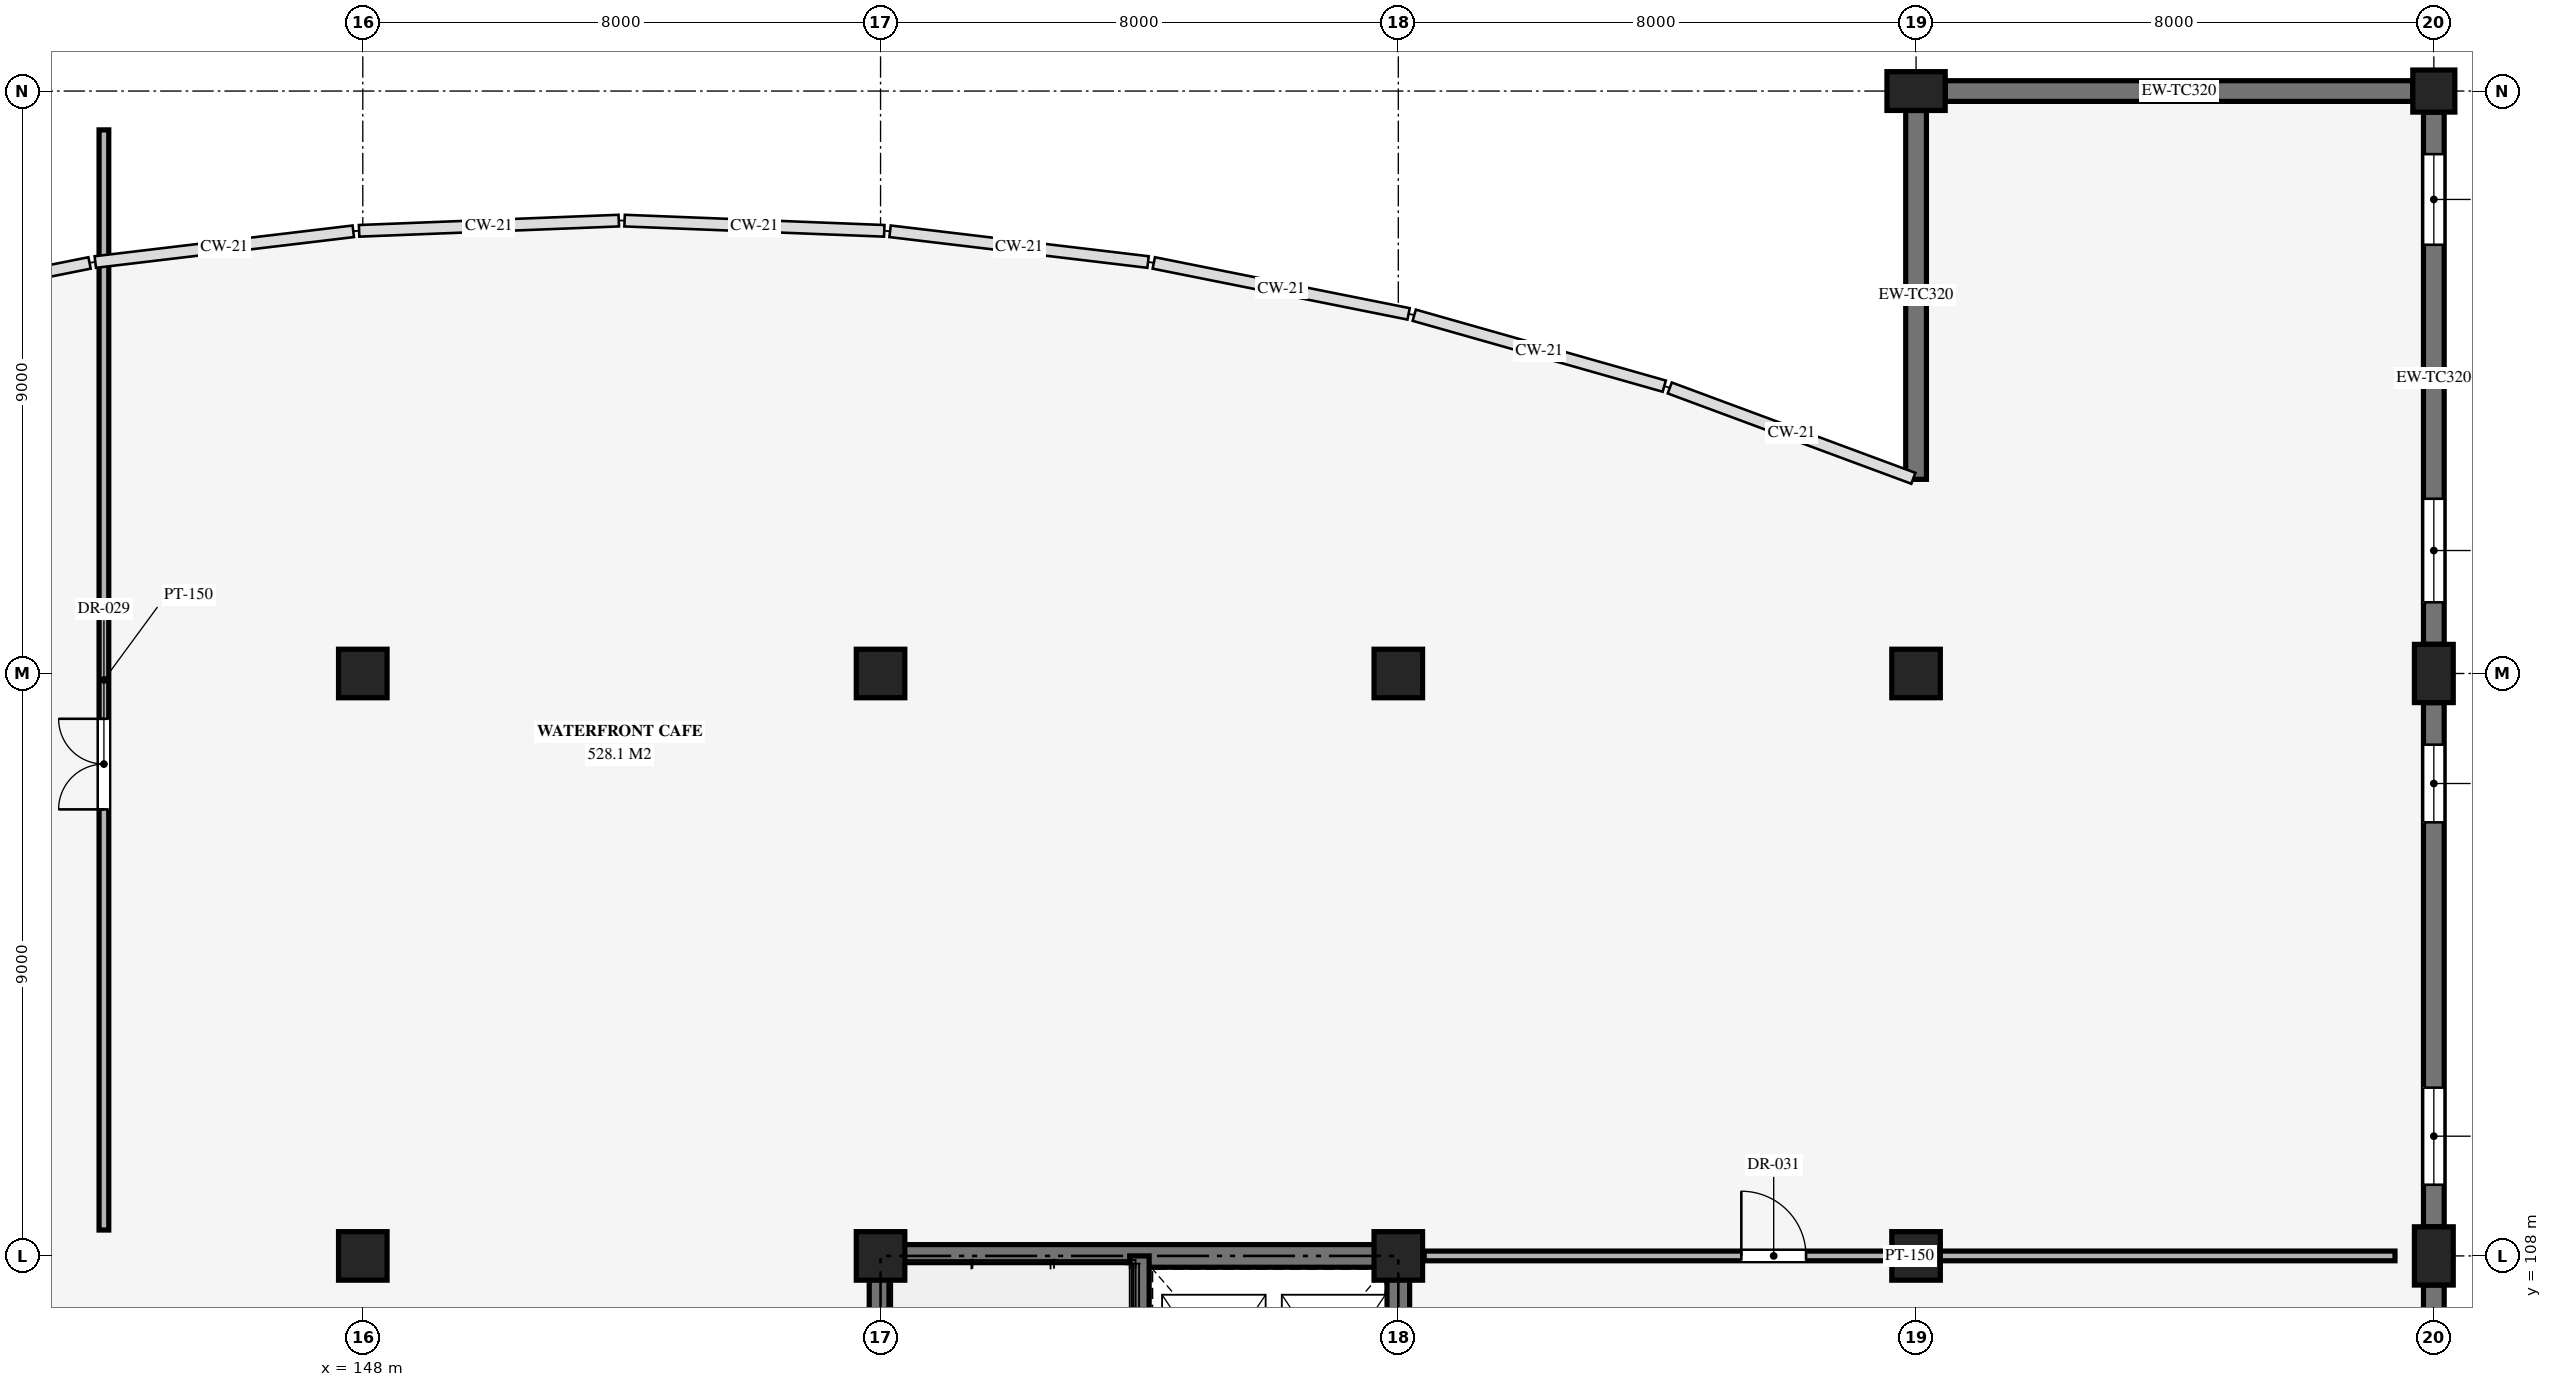
"""IFC4 building model, lengths in metres.
Left out: names, types, materials, properties, quantities, classifications, styles, units other than length and angle.
Written with IfcOpenShell. Run it as: python <this file> out.ifc"""

import sys

from ifc_helpers import new_model, si_unit, direction, frame, frame_2d, origin, origin_2d, place, context, subcontext, project, spatial, rectangle, extrude, element, fill, save


model = new_model("IFC4")
c1 = context("Model", 3, precision=1e-05, world=origin(), true_north=direction((0.0, 1.0)))
c2 = subcontext(c1, "Body", "Model", "MODEL_VIEW")
j1 = project(units=[si_unit("LENGTHUNIT", "METRE"), si_unit("PLANEANGLEUNIT", "RADIAN")], contexts=[c1])
p1 = place(None, origin())
s1 = spatial("IfcSite", under=j1, at=p1, CompositionType="ELEMENT")
p2 = place(p1, origin())
s2 = spatial("IfcBuilding", under=s1, at=p2, CompositionType="ELEMENT")
p3 = place(p2, frame((0.0, 0.0, 5.4)))
s3 = spatial("IfcBuildingStorey", under=s2, at=p3, CompositionType="ELEMENT", Elevation=5.4)
for number, where, z_axis, x_axis in (
    (1, (148.0, 108.0, 0.0), (0.0, 0.0, 1.0), (1.0, 0.0, 0.0)),
    (2, (148.0, 117.0, 0.0), (0.0, 0.0, 1.0), (1.0, 0.0, 0.0)),
    (3, (156.0, 108.0, 0.0), (0.0, 0.0, 1.0), (1.0, 0.0, 0.0)),
    (4, (156.0, 117.0, 0.0), (0.0, 0.0, 1.0), (1.0, 0.0, 0.0)),
    (5, (164.0, 108.0, 0.0), (0.0, 0.0, 1.0), (1.0, 0.0, 0.0)),
    (6, (164.0, 117.0, 0.0), (0.0, 0.0, 1.0), (1.0, 0.0, 0.0)),
    (7, (172.0, 108.0, 0.0), (0.0, 0.0, 1.0), (1.0, 0.0, 0.0)),
    (8, (172.0, 117.0, 0.0), (0.0, 0.0, 1.0), (1.0, 0.0, 0.0)),
):
    element("IfcColumn", number, at=place(p3, frame(where, z_axis=z_axis, x_axis=x_axis)), inside=s3, PredefinedType="COLUMN", context=c2, shape_type="SweptSolid", body=[
        extrude(rectangle(XDim=0.75, YDim=0.75, at=origin_2d()), origin(), (0.0, 0.0, 1.0), 4.64),
    ])
for number, where, z_axis, x_axis in (
    (9, (172.0, 126.0, 0.0), (0.0, 0.0, 1.0), (0.0, 1.0, 0.0)),
    (10, (180.0, 108.0, 0.0), (0.0, 0.0, 1.0), (1.0, 0.0, 0.0)),
    (11, (180.0, 117.0, 0.0), (0.0, 0.0, 1.0), (1.0, 0.0, 0.0)),
):
    element("IfcColumn", number, at=place(p3, frame(where, z_axis=z_axis, x_axis=x_axis)), inside=s3, PredefinedType="PILASTER", context=c2, shape_type="SweptSolid", body=[
        extrude(rectangle(XDim=0.6, YDim=0.9, at=origin_2d()), origin(), (0.0, 0.0, 1.0), 4.64),
    ])
p4 = place(p3, frame((180.0, 126.0, 0.0), z_axis=(0.0, 0.0, 1.0), x_axis=(1.0, 0.0, 0.0)))
e12 = element("IfcColumn", 12, at=p4, inside=s3, PredefinedType="COLUMN", context=c2, shape_type="SweptSolid", body=[
    extrude(rectangle(XDim=0.65, YDim=0.65, at=origin_2d()), origin(), (0.0, 0.0, 1.0), 4.64),
])
p5 = place(p3, frame((180.0, 99.45, 0.0), z_axis=(0.0, 0.0, 1.0), x_axis=(0.0, 1.0, 0.0)))
e13 = element("IfcWall", 13, at=p5, inside=s3, PredefinedType="SOLIDWALL", context=c2, shape_type="SweptSolid", body=[
    extrude(rectangle(XDim=8.1, YDim=0.32, at=frame_2d((4.05, 0.0))), origin(), (0.0, 0.0, 1.0), 4.52),
])
p6 = place(p5, frame((0.65, 0.0, 0.95)))
e14 = element("IfcOpeningElement", 14, at=p6, cuts=e13, PredefinedType="OPENING", context=c2, shape_type="SweptSolid", body=[
    extrude(rectangle(XDim=2.4, YDim=1.5, at=frame_2d((1.2, 0.75))), frame((0.0, 0.17, 0.0), z_axis=(0.0, -1.0, 0.0), x_axis=(1.0, 0.0, 0.0)), (0.0, 0.0, 1.0), 0.34),
])
p7 = place(p5, frame((5.65, 0.0, 0.95)))
e15 = element("IfcOpeningElement", 15, at=p7, cuts=e13, PredefinedType="OPENING", context=c2, shape_type="SweptSolid", body=[
    extrude(rectangle(XDim=1.8, YDim=1.5, at=frame_2d((0.9, 0.75))), frame((0.0, 0.17, 0.0), z_axis=(0.0, -1.0, 0.0), x_axis=(1.0, 0.0, 0.0)), (0.0, 0.0, 1.0), 0.34),
])
p8 = place(p3, frame((180.0, 108.45, 0.0), z_axis=(0.0, 0.0, 1.0), x_axis=(0.0, 1.0, 0.0)))
e16 = element("IfcWall", 16, at=p8, inside=s3, PredefinedType="SOLIDWALL", context=c2, shape_type="SweptSolid", body=[
    extrude(rectangle(XDim=8.1, YDim=0.32, at=frame_2d((4.05, 0.0))), origin(), (0.0, 0.0, 1.0), 4.52),
])
p9 = place(p8, frame((0.65, 0.0, 0.95)))
e17 = element("IfcOpeningElement", 17, at=p9, cuts=e16, PredefinedType="OPENING", context=c2, shape_type="SweptSolid", body=[
    extrude(rectangle(XDim=1.5, YDim=1.5, at=frame_2d((0.75, 0.75))), frame((0.0, 0.17, 0.0), z_axis=(0.0, -1.0, 0.0), x_axis=(1.0, 0.0, 0.0)), (0.0, 0.0, 1.0), 0.34),
])
p10 = place(p8, frame((6.25, 0.0, 0.95)))
e18 = element("IfcOpeningElement", 18, at=p10, cuts=e16, PredefinedType="OPENING", context=c2, shape_type="SweptSolid", body=[
    extrude(rectangle(XDim=1.2, YDim=1.5, at=frame_2d((0.6, 0.75))), frame((0.0, 0.17, 0.0), z_axis=(0.0, -1.0, 0.0), x_axis=(1.0, 0.0, 0.0)), (0.0, 0.0, 1.0), 0.34),
])
p11 = place(p3, frame((180.0, 117.45, 0.0), z_axis=(0.0, 0.0, 1.0), x_axis=(0.0, 1.0, 0.0)))
e19 = element("IfcWall", 19, at=p11, inside=s3, PredefinedType="SOLIDWALL", context=c2, shape_type="SweptSolid", body=[
    extrude(rectangle(XDim=8.225, YDim=0.32, at=frame_2d((4.113, 0.0))), origin(), (0.0, 0.0, 1.0), 4.52),
])
p12 = place(p11, frame((0.65, 0.0, 0.95)))
e20 = element("IfcOpeningElement", 20, at=p12, cuts=e19, PredefinedType="OPENING", context=c2, shape_type="SweptSolid", body=[
    extrude(rectangle(XDim=1.6, YDim=1.6, at=frame_2d((0.8, 0.8))), frame((0.0, 0.17, 0.0), z_axis=(0.0, -1.0, 0.0), x_axis=(1.0, 0.0, 0.0)), (0.0, 0.0, 1.0), 0.34),
])
p13 = place(p11, frame((6.175, 0.0, 0.95)))
e21 = element("IfcOpeningElement", 21, at=p13, cuts=e19, PredefinedType="OPENING", context=c2, shape_type="SweptSolid", body=[
    extrude(rectangle(XDim=1.4, YDim=1.4, at=frame_2d((0.7, 0.7))), frame((0.0, 0.17, 0.0), z_axis=(0.0, -1.0, 0.0), x_axis=(1.0, 0.0, 0.0)), (0.0, 0.0, 1.0), 0.34),
])
p14 = place(p3, frame((172.0, 120.0, 0.0), z_axis=(0.0, 0.0, 1.0), x_axis=(0.0, 1.0, 0.0)))
e22 = element("IfcWall", 22, at=p14, inside=s3, PredefinedType="SOLIDWALL", context=c2, shape_type="SweptSolid", body=[
    extrude(rectangle(XDim=5.7, YDim=0.32, at=frame_2d((2.85, 0.0))), origin(), (0.0, 0.0, 1.0), 4.52),
])
p15 = place(p3, frame((172.45, 126.0, 0.0), z_axis=(0.0, 0.0, 1.0), x_axis=(1.0, 0.0, 0.0)))
e23 = element("IfcWall", 23, at=p15, inside=s3, PredefinedType="SOLIDWALL", context=c2, shape_type="SweptSolid", body=[
    extrude(rectangle(XDim=7.225, YDim=0.32, at=frame_2d((3.613, 0.0))), origin(), (0.0, 0.0, 1.0), 4.52),
])
p16 = place(p3, frame((156.0, 108.0, 0.0), z_axis=(0.0, 0.0, 1.0), x_axis=(1.0, 0.0, 0.0)))
e24 = element("IfcWall", 24, at=p16, inside=s3, PredefinedType="SHEAR", context=c2, shape_type="SweptSolid", body=[
    extrude(rectangle(XDim=8.0, YDim=0.35, at=frame_2d((4.0, 0.0))), origin(), (0.0, 0.0, 1.0), 4.78),
])
p17 = place(p3, frame((156.0, 99.0, 0.0), z_axis=(0.0, 0.0, 1.0), x_axis=(0.0, 1.0, 0.0)))
e25 = element("IfcWall", 25, at=p17, inside=s3, PredefinedType="SHEAR", context=c2, shape_type="SweptSolid", body=[
    extrude(rectangle(XDim=9.0, YDim=0.35, at=frame_2d((4.5, 0.0))), origin(), (0.0, 0.0, 1.0), 4.78),
])
p18 = place(p3, frame((164.0, 99.0, 0.0), z_axis=(0.0, 0.0, 1.0), x_axis=(0.0, 1.0, 0.0)))
e26 = element("IfcWall", 26, at=p18, inside=s3, PredefinedType="SHEAR", context=c2, shape_type="SweptSolid", body=[
    extrude(rectangle(XDim=9.0, YDim=0.35, at=frame_2d((4.5, 0.0))), origin(), (0.0, 0.0, 1.0), 4.78),
])
p19 = place(p18, frame((1.4, 0.0, 0.0)))
e27 = element("IfcOpeningElement", 27, at=p19, cuts=e26, PredefinedType="OPENING", context=c2, shape_type="SweptSolid", body=[
    extrude(rectangle(XDim=1.5, YDim=2.2, at=frame_2d((0.75, 1.1))), frame((0.0, 0.185, 0.0), z_axis=(0.0, -1.0, 0.0), x_axis=(1.0, 0.0, 0.0)), (0.0, 0.0, 1.0), 0.37),
])
p20 = place(p3, frame((160.0, 108.0, 0.0), z_axis=(0.0, 0.0, 1.0), x_axis=(0.0, -1.0, 0.0)))
e28 = element("IfcWall", 28, at=p20, inside=s3, PredefinedType="SHEAR", context=c2, shape_type="SweptSolid", body=[
    extrude(rectangle(XDim=9.0, YDim=0.3, at=frame_2d((4.5, 0.0))), origin(), (0.0, 0.0, 1.0), 4.78),
])
p21 = place(p20, frame((7.45, 0.0, 0.0)))
e29 = element("IfcOpeningElement", 29, at=p21, cuts=e28, PredefinedType="OPENING", context=c2, shape_type="SweptSolid", body=[
    extrude(rectangle(XDim=1.05, YDim=2.15, at=frame_2d((0.525, 1.075))), frame((0.0, 0.16, 0.0), z_axis=(0.0, -1.0, 0.0), x_axis=(1.0, 0.0, 0.0)), (0.0, 0.0, 1.0), 0.32),
])
p22 = place(p3, frame((144.0, 108.4, 0.0), z_axis=(0.0, 0.0, 1.0), x_axis=(0.0, 1.0, 0.0)))
e30 = element("IfcWall", 30, at=p22, inside=s3, PredefinedType="PARTITIONING", context=c2, shape_type="SweptSolid", body=[
    extrude(rectangle(XDim=17.0, YDim=0.15, at=frame_2d((8.5, 0.0))), origin(), (0.0, 0.0, 1.0), 3.65),
])
p23 = place(p22, frame((6.5, 0.0, 0.0)))
e31 = element("IfcOpeningElement", 31, at=p23, cuts=e30, PredefinedType="OPENING", context=c2, shape_type="SweptSolid", body=[
    extrude(rectangle(XDim=1.4, YDim=2.15, at=frame_2d((0.7, 1.075))), frame((0.0, 0.085, 0.0), z_axis=(0.0, -1.0, 0.0), x_axis=(1.0, 0.0, 0.0)), (0.0, 0.0, 1.0), 0.17),
])
p24 = place(p3, frame((164.4, 108.0, 0.0), z_axis=(0.0, 0.0, 1.0), x_axis=(1.0, 0.0, 0.0)))
e32 = element("IfcWall", 32, at=p24, inside=s3, PredefinedType="PARTITIONING", context=c2, shape_type="SweptSolid", body=[
    extrude(rectangle(XDim=15.0, YDim=0.15, at=frame_2d((7.5, 0.0))), origin(), (0.0, 0.0, 1.0), 3.65),
])
p25 = place(p24, frame((4.9, 0.0, 0.0)))
e33 = element("IfcOpeningElement", 33, at=p25, cuts=e32, PredefinedType="OPENING", context=c2, shape_type="SweptSolid", body=[
    extrude(rectangle(XDim=1.0, YDim=2.15, at=frame_2d((0.5, 1.075))), frame((0.0, 0.085, 0.0), z_axis=(0.0, -1.0, 0.0), x_axis=(1.0, 0.0, 0.0)), (0.0, 0.0, 1.0), 0.17),
])
p26 = place(p9, origin())
e34 = element("IfcWindow", 34, at=p26, inside=s3, PartitioningType="SINGLE_PANEL", PredefinedType="WINDOW", context=c2, shape_type="SweptSolid", body=[
    extrude(rectangle(XDim=1.5, YDim=1.5, at=frame_2d((0.75, 0.75))), frame((0.0, 0.03, 0.0), z_axis=(0.0, -1.0, 0.0), x_axis=(1.0, 0.0, 0.0)), (0.0, 0.0, 1.0), 0.06),
])
fill(e17, e34)
p27 = place(p10, origin())
e35 = element("IfcWindow", 35, at=p27, inside=s3, PartitioningType="SINGLE_PANEL", PredefinedType="WINDOW", context=c2, shape_type="SweptSolid", body=[
    extrude(rectangle(XDim=1.2, YDim=1.5, at=frame_2d((0.6, 0.75))), frame((0.0, 0.03, 0.0), z_axis=(0.0, -1.0, 0.0), x_axis=(1.0, 0.0, 0.0)), (0.0, 0.0, 1.0), 0.06),
])
fill(e18, e35)
p28 = place(p12, origin())
e36 = element("IfcWindow", 36, at=p28, inside=s3, PartitioningType="SINGLE_PANEL", PredefinedType="WINDOW", context=c2, shape_type="SweptSolid", body=[
    extrude(rectangle(XDim=1.6, YDim=1.6, at=frame_2d((0.8, 0.8))), frame((0.0, 0.03, 0.0), z_axis=(0.0, -1.0, 0.0), x_axis=(1.0, 0.0, 0.0)), (0.0, 0.0, 1.0), 0.06),
])
fill(e20, e36)
p29 = place(p13, origin())
e37 = element("IfcWindow", 37, at=p29, inside=s3, PartitioningType="SINGLE_PANEL", PredefinedType="WINDOW", context=c2, shape_type="SweptSolid", body=[
    extrude(rectangle(XDim=1.4, YDim=1.4, at=frame_2d((0.7, 0.7))), frame((0.0, 0.03, 0.0), z_axis=(0.0, -1.0, 0.0), x_axis=(1.0, 0.0, 0.0)), (0.0, 0.0, 1.0), 0.06),
])
fill(e21, e37)
p30 = place(p23, origin())
e38 = element("IfcDoor", 38, at=p30, inside=s3, OperationType="DOUBLE_DOOR_SINGLE_SWING", PredefinedType="DOOR", context=c2, shape_type="SweptSolid", body=[
    extrude(rectangle(XDim=1.4, YDim=2.15, at=frame_2d((0.7, 1.075))), frame((0.0, 0.025, 0.0), z_axis=(0.0, -1.0, 0.0), x_axis=(1.0, 0.0, 0.0)), (0.0, 0.0, 1.0), 0.05),
])
fill(e31, e38)
p31 = place(p25, origin())
e39 = element("IfcDoor", 39, at=p31, inside=s3, OperationType="SINGLE_SWING_LEFT", PredefinedType="DOOR", context=c2, shape_type="SweptSolid", body=[
    extrude(rectangle(XDim=1.0, YDim=2.15, at=frame_2d((0.5, 1.075))), frame((0.0, 0.025, 0.0), z_axis=(0.0, -1.0, 0.0), x_axis=(1.0, 0.0, 0.0)), (0.0, 0.0, 1.0), 0.05),
])
fill(e33, e39)
save(model, sys.argv[1])
